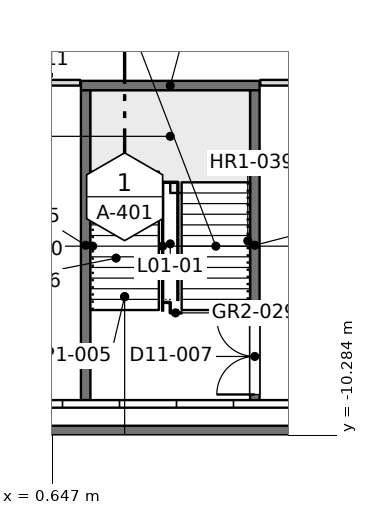
"""IFC4 building model, lengths in metres.
Left out: names, types, materials, properties, quantities, classifications, styles, units other than length and angle.
Written with IfcOpenShell. Run it as: python <this file> out.ifc"""

import sys

from ifc_helpers import new_model, si_unit, direction, frame, frame_2d, origin, place, context, subcontext, project, spatial, rectangle, extrude, element, fill, save


model = new_model("IFC4")
c1 = context("Model", 3, precision=1e-05, world=origin(), true_north=direction((0.0, 1.0)))
c2 = subcontext(c1, "Body", "Model", "MODEL_VIEW")
j1 = project(units=[si_unit("LENGTHUNIT", "METRE"), si_unit("PLANEANGLEUNIT", "RADIAN")], contexts=[c1])
p1 = place(None, origin())
s1 = spatial("IfcSite", under=j1, at=p1, CompositionType="ELEMENT")
p2 = place(p1, origin())
s2 = spatial("IfcBuilding", under=s1, at=p2, CompositionType="ELEMENT")
p3 = place(p2, frame((0.0, 0.0, 5.4)))
s3 = spatial("IfcBuildingStorey", under=s2, at=p3, CompositionType="ELEMENT", Elevation=5.4)
p4 = place(p3, frame((60.675, -10.15, 0.0), z_axis=(0.0, 0.0, 1.0), x_axis=(-1.0, 0.0, 0.0)))
e1 = element("IfcWall", 1, at=p4, inside=s3, PredefinedType="PARAPET", context=c2, shape_type="SweptSolid", body=[
    extrude(rectangle(XDim=70.95, YDim=0.25, at=frame_2d((35.475, 0.0))), origin(), (0.0, 0.0, 1.0), 1.1),
])
p5 = place(p3, frame((-1.0, -1.0, 0.0), z_axis=(0.0, 0.0, 1.0), x_axis=(1.0, 0.0, 0.0)))
e2 = element("IfcWall", 2, at=p5, inside=s3, PredefinedType="PARTITIONING", context=c2, shape_type="SweptSolid", body=[
    extrude(rectangle(XDim=2.38, YDim=0.15, at=frame_2d((1.19, 0.0))), origin(), (0.0, 0.0, 1.0), 3.7),
])
p6 = place(p3, frame((6.12, -1.0, 0.0), z_axis=(0.0, 0.0, 1.0), x_axis=(1.0, 0.0, 0.0)))
e3 = element("IfcWall", 3, at=p6, inside=s3, PredefinedType="PARTITIONING", context=c2, shape_type="SweptSolid", body=[
    extrude(rectangle(XDim=38.16, YDim=0.15, at=frame_2d((19.08, 0.0))), origin(), (0.0, 0.0, 1.0), 3.7),
])
p7 = place(p6, frame((13.98, 0.0, 0.0)))
e4 = element("IfcOpeningElement", 4, at=p7, cuts=e3, PredefinedType="OPENING", context=c2, shape_type="SweptSolid", body=[
    extrude(rectangle(XDim=1.8, YDim=2.2, at=frame_2d((0.9, 1.1))), frame((0.0, 0.085, 0.0), z_axis=(0.0, -1.0, 0.0), x_axis=(1.0, 0.0, 0.0)), (0.0, 0.0, 1.0), 0.17),
])
p8 = place(p6, frame((22.38, 0.0, 0.0)))
e5 = element("IfcOpeningElement", 5, at=p8, cuts=e3, PredefinedType="OPENING", context=c2, shape_type="SweptSolid", body=[
    extrude(rectangle(XDim=1.8, YDim=2.2, at=frame_2d((0.9, 1.1))), frame((0.0, 0.085, 0.0), z_axis=(0.0, -1.0, 0.0), x_axis=(1.0, 0.0, 0.0)), (0.0, 0.0, 1.0), 0.17),
])
p9 = place(p3, frame((1.525, -9.352, 0.0), z_axis=(0.0, 0.0, 1.0), x_axis=(0.0, 1.0, 0.0)))
e6 = element("IfcWall", 6, at=p9, inside=s3, PredefinedType="SOLIDWALL", context=c2, shape_type="SweptSolid", body=[
    extrude(rectangle(XDim=8.152, YDim=0.25, at=frame_2d((4.076, 0.0))), origin(), (0.0, 0.0, 1.0), 4.5),
])
p10 = place(p3, frame((5.975, -9.352, 0.0), z_axis=(0.0, 0.0, 1.0), x_axis=(0.0, 1.0, 0.0)))
e7 = element("IfcWall", 7, at=p10, inside=s3, PredefinedType="SOLIDWALL", context=c2, shape_type="SweptSolid", body=[
    extrude(rectangle(XDim=8.152, YDim=0.25, at=frame_2d((4.076, 0.0))), origin(), (0.0, 0.0, 1.0), 4.5),
])
p11 = place(p10, frame((0.15, 0.0, 0.0)))
e8 = element("IfcOpeningElement", 8, at=p11, cuts=e7, PredefinedType="OPENING", context=c2, shape_type="SweptSolid", body=[
    extrude(rectangle(XDim=2.0, YDim=2.2, at=frame_2d((1.0, 1.1))), frame((0.0, 0.135, 0.0), z_axis=(0.0, -1.0, 0.0), x_axis=(1.0, 0.0, 0.0)), (0.0, 0.0, 1.0), 0.27),
])
p12 = place(p3, frame((1.4, -1.075, 0.0), z_axis=(0.0, 0.0, 1.0), x_axis=(1.0, 0.0, 0.0)))
e9 = element("IfcWall", 9, at=p12, inside=s3, PredefinedType="SOLIDWALL", context=c2, shape_type="SweptSolid", body=[
    extrude(rectangle(XDim=4.7, YDim=0.25, at=frame_2d((2.35, 0.0))), origin(), (0.0, 0.0, 1.0), 4.5),
])
p13 = place(p11, origin())
e10 = element("IfcDoor", 10, at=p13, inside=s3, OperationType="DOUBLE_DOOR_SINGLE_SWING", PredefinedType="DOOR", context=c2, shape_type="SweptSolid", body=[
    extrude(rectangle(XDim=2.0, YDim=2.2, at=frame_2d((1.0, 1.1))), frame((0.0, 0.025, 0.0), z_axis=(0.0, -1.0, 0.0), x_axis=(1.0, 0.0, 0.0)), (0.0, 0.0, 1.0), 0.05),
])
fill(e8, e10)
save(model, sys.argv[1])
